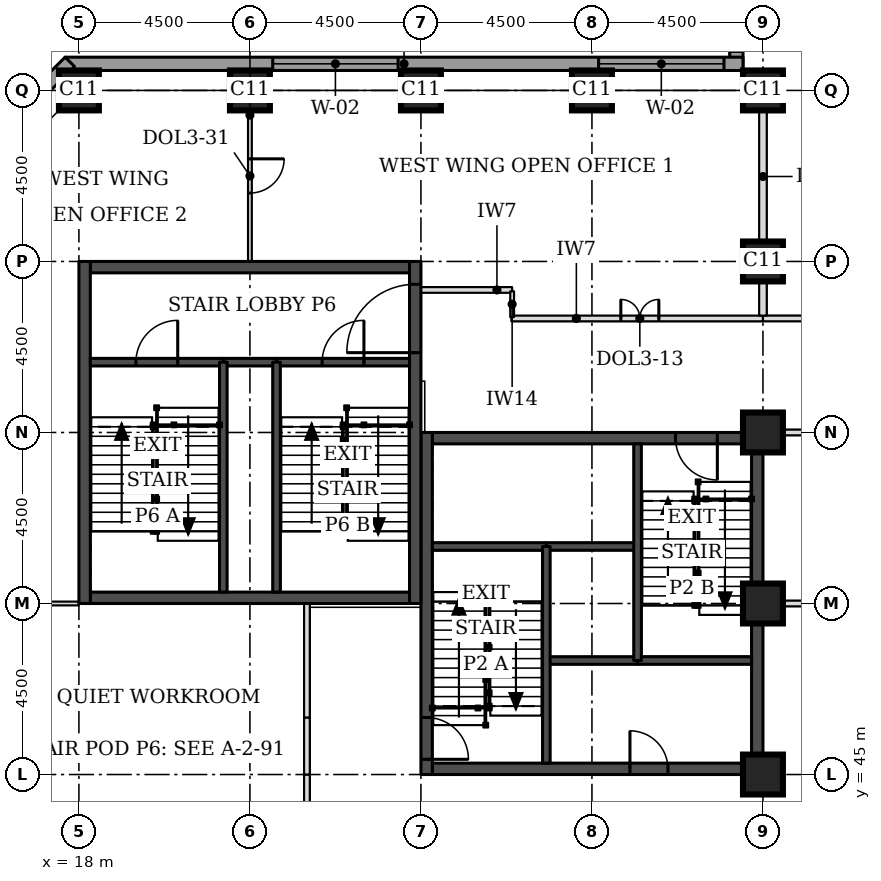
"""IFC4 building model, lengths in metres.
Left out: names, types, materials, properties, quantities, classifications, styles, units other than length and angle.
Written with IfcOpenShell. Run it as: python <this file> out.ifc"""

import sys

from ifc_helpers import new_model, si_unit, direction, frame, frame_2d, origin, origin_2d, place, context, subcontext, project, spatial, rectangle, extrude, element, fill, save


model = new_model("IFC4")
c1 = context("Model", 3, precision=1e-05, world=origin(), true_north=direction((0.0, 1.0)))
c2 = subcontext(c1, "Body", "Model", "MODEL_VIEW")
j1 = project(units=[si_unit("LENGTHUNIT", "METRE"), si_unit("PLANEANGLEUNIT", "RADIAN")], contexts=[c1])
p1 = place(None, origin())
s1 = spatial("IfcSite", under=j1, at=p1, CompositionType="ELEMENT")
p2 = place(p1, origin())
s2 = spatial("IfcBuilding", under=s1, at=p2, CompositionType="ELEMENT")
p3 = place(p2, frame((0.0, 0.0, 93.7)))
s3 = spatial("IfcBuildingStorey", under=s2, at=p3, CompositionType="ELEMENT", Elevation=93.7)
for number, where, z_axis, x_axis in (
    (1, (36.0, 45.0, 0.0), (0.0, 0.0, 1.0), (1.0, 0.0, 0.0)),
    (2, (36.0, 49.5, 0.0), (0.0, 0.0, 1.0), (1.0, 0.0, 0.0)),
    (3, (36.0, 54.0, 0.0), (0.0, 0.0, 1.0), (1.0, 0.0, 0.0)),
    (4, (36.0, 58.5, 0.0), (0.0, 0.0, 1.0), (1.0, 0.0, 0.0)),
    (5, (18.0, 63.0, 0.0), (0.0, 0.0, 1.0), (1.0, 0.0, 0.0)),
    (6, (22.5, 63.0, 0.0), (0.0, 0.0, 1.0), (1.0, 0.0, 0.0)),
    (7, (27.0, 63.0, 0.0), (0.0, 0.0, 1.0), (1.0, 0.0, 0.0)),
    (8, (31.5, 63.0, 0.0), (0.0, 0.0, 1.0), (1.0, 0.0, 0.0)),
    (9, (36.0, 63.0, 0.0), (0.0, 0.0, 1.0), (1.0, 0.0, 0.0)),
):
    element("IfcColumn", number, at=place(p3, frame(where, z_axis=z_axis, x_axis=x_axis)), inside=s3, PredefinedType="COLUMN", context=c2, shape_type="SweptSolid", body=[
        extrude(rectangle(XDim=1.05, YDim=1.05, at=origin_2d()), origin(), (0.0, 0.0, 1.0), 3.7),
    ])
p4 = place(p3, frame((27.3, 45.15, 0.0), z_axis=(0.0, 0.0, 1.0), x_axis=(1.0, 0.0, 0.0)))
e10 = element("IfcWall", 10, at=p4, inside=s3, PredefinedType="SHEAR", context=c2, shape_type="SweptSolid", body=[
    extrude(rectangle(XDim=8.4, YDim=0.3, at=frame_2d((4.2, 0.0))), origin(), (0.0, 0.0, 1.0), 3.7),
])
p5 = place(p4, frame((5.2, 0.0, 0.0)))
e11 = element("IfcOpeningElement", 11, at=p5, cuts=e10, PredefinedType="OPENING", context=c2, shape_type="SweptSolid", body=[
    extrude(rectangle(XDim=1.0, YDim=2.1, at=frame_2d((0.5, 1.05))), frame((0.0, 0.16, 0.0), z_axis=(0.0, -1.0, 0.0), x_axis=(1.0, 0.0, 0.0)), (0.0, 0.0, 1.0), 0.32),
])
p6 = place(p3, frame((27.3, 53.85, 0.0), z_axis=(0.0, 0.0, 1.0), x_axis=(1.0, 0.0, 0.0)))
e12 = element("IfcWall", 12, at=p6, inside=s3, PredefinedType="SHEAR", context=c2, shape_type="SweptSolid", body=[
    extrude(rectangle(XDim=8.4, YDim=0.3, at=frame_2d((4.2, 0.0))), origin(), (0.0, 0.0, 1.0), 3.7),
])
p7 = place(p6, frame((6.4, 0.0, 0.0)))
e13 = element("IfcOpeningElement", 13, at=p7, cuts=e12, PredefinedType="OPENING", context=c2, shape_type="SweptSolid", body=[
    extrude(rectangle(XDim=1.1, YDim=2.1, at=frame_2d((0.55, 1.05))), frame((0.0, 0.16, 0.0), z_axis=(0.0, -1.0, 0.0), x_axis=(1.0, 0.0, 0.0)), (0.0, 0.0, 1.0), 0.32),
])
p8 = place(p3, frame((27.15, 45.0, 0.0), z_axis=(0.0, 0.0, 1.0), x_axis=(0.0, 1.0, 0.0)))
e14 = element("IfcWall", 14, at=p8, inside=s3, PredefinedType="SHEAR", context=c2, shape_type="SweptSolid", body=[
    extrude(rectangle(XDim=9.0, YDim=0.3, at=frame_2d((4.5, 0.0))), origin(), (0.0, 0.0, 1.0), 3.7),
])
p9 = place(p8, frame((0.4, 0.0, 0.0)))
e15 = element("IfcOpeningElement", 15, at=p9, cuts=e14, PredefinedType="OPENING", context=c2, shape_type="SweptSolid", body=[
    extrude(rectangle(XDim=1.1, YDim=2.1, at=frame_2d((0.55, 1.05))), frame((0.0, 0.16, 0.0), z_axis=(0.0, -1.0, 0.0), x_axis=(1.0, 0.0, 0.0)), (0.0, 0.0, 1.0), 0.32),
])
p10 = place(p3, frame((35.85, 45.0, 0.0), z_axis=(0.0, 0.0, 1.0), x_axis=(0.0, 1.0, 0.0)))
e16 = element("IfcWall", 16, at=p10, inside=s3, PredefinedType="SHEAR", context=c2, shape_type="SweptSolid", body=[
    extrude(rectangle(XDim=9.0, YDim=0.3, at=frame_2d((4.5, 0.0))), origin(), (0.0, 0.0, 1.0), 3.7),
])
for number, where, z_axis, x_axis in (
    (17, (18.3, 49.65, 0.0), (0.0, 0.0, 1.0), (1.0, 0.0, 0.0)),
    (18, (18.3, 58.35, 0.0), (0.0, 0.0, 1.0), (1.0, 0.0, 0.0)),
):
    element("IfcWall", number, at=place(p3, frame(where, z_axis=z_axis, x_axis=x_axis)), inside=s3, PredefinedType="SHEAR", context=c2, shape_type="SweptSolid", body=[
        extrude(rectangle(XDim=8.4, YDim=0.3, at=frame_2d((4.2, 0.0))), origin(), (0.0, 0.0, 1.0), 3.7),
    ])
p11 = place(p3, frame((18.15, 49.5, 0.0), z_axis=(0.0, 0.0, 1.0), x_axis=(0.0, 1.0, 0.0)))
e19 = element("IfcWall", 19, at=p11, inside=s3, PredefinedType="SHEAR", context=c2, shape_type="SweptSolid", body=[
    extrude(rectangle(XDim=9.0, YDim=0.3, at=frame_2d((4.5, 0.0))), origin(), (0.0, 0.0, 1.0), 3.7),
])
p12 = place(p3, frame((26.85, 49.5, 0.0), z_axis=(0.0, 0.0, 1.0), x_axis=(0.0, 1.0, 0.0)))
e20 = element("IfcWall", 20, at=p12, inside=s3, PredefinedType="SHEAR", context=c2, shape_type="SweptSolid", body=[
    extrude(rectangle(XDim=9.0, YDim=0.3, at=frame_2d((4.5, 0.0))), origin(), (0.0, 0.0, 1.0), 3.7),
])
p13 = place(p12, frame((6.6, 0.0, 0.0)))
e21 = element("IfcOpeningElement", 21, at=p13, cuts=e20, PredefinedType="OPENING", context=c2, shape_type="SweptSolid", body=[
    extrude(rectangle(XDim=1.8, YDim=2.1, at=frame_2d((0.9, 1.05))), frame((0.0, 0.16, 0.0), z_axis=(0.0, -1.0, 0.0), x_axis=(1.0, 0.0, 0.0)), (0.0, 0.0, 1.0), 0.32),
])
p14 = place(p3, frame((35.3, 76.862, 0.0), z_axis=(0.0, 0.0, 1.0), x_axis=(0.0, -1.0, 0.0)))
e22 = element("IfcWall", 22, at=p14, inside=s3, PredefinedType="STANDARD", context=c2, shape_type="SweptSolid", body=[
    extrude(rectangle(XDim=13.337, YDim=0.35, at=frame_2d((6.669, 0.0))), origin(), (0.0, 0.0, 1.0), 3.525),
])
p15 = place(p14, frame((9.537, 0.0, 0.9)))
e23 = element("IfcOpeningElement", 23, at=p15, cuts=e22, PredefinedType="OPENING", context=c2, shape_type="SweptSolid", body=[
    extrude(rectangle(XDim=3.3, YDim=1.9, at=frame_2d((1.65, 0.95))), frame((0.0, 0.185, 0.0), z_axis=(0.0, -1.0, 0.0), x_axis=(1.0, 0.0, 0.0)), (0.0, 0.0, 1.0), 0.37),
])
p16 = place(p3, frame((35.475, 63.7, 0.0), z_axis=(0.0, 0.0, 1.0), x_axis=(-1.0, 0.0, 0.0)))
e24 = element("IfcWall", 24, at=p16, inside=s3, PredefinedType="STANDARD", context=c2, shape_type="SweptSolid", body=[
    extrude(rectangle(XDim=17.837, YDim=0.35, at=frame_2d((8.919, 0.0))), origin(), (0.0, 0.0, 1.0), 3.525),
])
p17 = place(p16, frame((0.5, 0.0, 0.9)))
e25 = element("IfcOpeningElement", 25, at=p17, cuts=e24, PredefinedType="OPENING", context=c2, shape_type="SweptSolid", body=[
    extrude(rectangle(XDim=3.3, YDim=1.9, at=frame_2d((1.65, 0.95))), frame((0.0, 0.185, 0.0), z_axis=(0.0, -1.0, 0.0), x_axis=(1.0, 0.0, 0.0)), (0.0, 0.0, 1.0), 0.37),
])
p18 = place(p16, frame((9.075, 0.0, 0.9)))
e26 = element("IfcOpeningElement", 26, at=p18, cuts=e24, PredefinedType="OPENING", context=c2, shape_type="SweptSolid", body=[
    extrude(rectangle(XDim=3.3, YDim=1.9, at=frame_2d((1.65, 0.95))), frame((0.0, 0.185, 0.0), z_axis=(0.0, -1.0, 0.0), x_axis=(1.0, 0.0, 0.0)), (0.0, 0.0, 1.0), 0.37),
])
p19 = place(p3, frame((17.761, 63.751, 0.0), z_axis=(0.0, 0.0, 1.0), x_axis=(-0.707106781187, -0.707106781187, 0.0)))
e27 = element("IfcWall", 27, at=p19, inside=s3, PredefinedType="STANDARD", context=c2, shape_type="SweptSolid", body=[
    extrude(rectangle(XDim=7.089, YDim=0.35, at=frame_2d((3.544, 0.0))), origin(), (0.0, 0.0, 1.0), 3.525),
])
p20 = place(p19, frame((1.894, 0.0, 0.9)))
e28 = element("IfcOpeningElement", 28, at=p20, cuts=e27, PredefinedType="OPENING", context=c2, shape_type="SweptSolid", body=[
    extrude(rectangle(XDim=3.3, YDim=1.9, at=frame_2d((1.65, 0.95))), frame((0.0, 0.185, 0.0), z_axis=(0.0, -1.0, 0.0), x_axis=(1.0, 0.0, 0.0)), (0.0, 0.0, 1.0), 0.37),
])
p21 = place(p3, frame((12.749, 44.761, 0.0), z_axis=(0.0, 0.0, 1.0), x_axis=(0.707106781187, -0.707106781187, 0.0)))
e29 = element("IfcWall", 29, at=p21, inside=s3, PredefinedType="STANDARD", context=c2, shape_type="SweptSolid", body=[
    extrude(rectangle(XDim=7.089, YDim=0.35, at=frame_2d((3.544, 0.0))), origin(), (0.0, 0.0, 1.0), 3.525),
])
p22 = place(p21, frame((1.894, 0.0, 0.9)))
e30 = element("IfcOpeningElement", 30, at=p22, cuts=e29, PredefinedType="OPENING", context=c2, shape_type="SweptSolid", body=[
    extrude(rectangle(XDim=3.3, YDim=1.9, at=frame_2d((1.65, 0.95))), frame((0.0, 0.185, 0.0), z_axis=(0.0, -1.0, 0.0), x_axis=(1.0, 0.0, 0.0)), (0.0, 0.0, 1.0), 0.37),
])
for number, where, z_axis, x_axis in (
    (31, (36.525, 49.5, 0.0), (0.0, 0.0, 1.0), (1.0, 0.0, 0.0)),
    (32, (36.525, 54.0, 0.0), (0.0, 0.0, 1.0), (1.0, 0.0, 0.0)),
):
    element("IfcWall", number, at=place(p3, frame(where, z_axis=z_axis, x_axis=x_axis)), inside=s3, PredefinedType="PARTITIONING", context=c2, shape_type="SweptSolid", body=[
        extrude(rectangle(XDim=5.55, YDim=0.15, at=frame_2d((2.775, 0.0))), origin(), (0.0, 0.0, 1.0), 3.55),
    ])
p23 = place(p3, frame((29.38, 57.0, 0.0), z_axis=(0.0, 0.0, 1.0), x_axis=(1.0, 0.0, 0.0)))
e33 = element("IfcWall", 33, at=p23, inside=s3, PredefinedType="PARTITIONING", context=c2, shape_type="SweptSolid", body=[
    extrude(rectangle(XDim=6.62, YDim=0.15, at=frame_2d((3.31, 0.0))), origin(), (0.0, 0.0, 1.0), 3.55),
])
p24 = place(p23, frame((2.88, 0.0, 0.0)))
e34 = element("IfcOpeningElement", 34, at=p24, cuts=e33, PredefinedType="OPENING", context=c2, shape_type="SweptSolid", body=[
    extrude(rectangle(XDim=1.0, YDim=2.1, at=frame_2d((0.5, 1.05))), frame((0.0, 0.085, 0.0), z_axis=(0.0, -1.0, 0.0), x_axis=(1.0, 0.0, 0.0)), (0.0, 0.0, 1.0), 0.17),
])
p25 = place(p3, frame((36.0, 57.0, 0.0), z_axis=(0.0, 0.0, 1.0), x_axis=(1.0, 0.0, 0.0)))
e35 = element("IfcWall", 35, at=p25, inside=s3, PredefinedType="PARTITIONING", context=c2, shape_type="SweptSolid", body=[
    extrude(rectangle(XDim=6.075, YDim=0.15, at=frame_2d((3.038, 0.0))), origin(), (0.0, 0.0, 1.0), 3.55),
])
p26 = place(p25, frame((2.55, 0.0, 0.0)))
e36 = element("IfcOpeningElement", 36, at=p26, cuts=e35, PredefinedType="OPENING", context=c2, shape_type="SweptSolid", body=[
    extrude(rectangle(XDim=1.0, YDim=2.1, at=frame_2d((0.5, 1.05))), frame((0.0, 0.085, 0.0), z_axis=(0.0, -1.0, 0.0), x_axis=(1.0, 0.0, 0.0)), (0.0, 0.0, 1.0), 0.17),
])
for number, where, z_axis, x_axis in (
    (37, (24.0, 43.5, 0.0), (0.0, 0.0, 1.0), (0.0, 1.0, 0.0)),
    (38, (24.0, 45.0, 0.0), (0.0, 0.0, 1.0), (0.0, 1.0, 0.0)),
):
    element("IfcWall", number, at=place(p3, frame(where, z_axis=z_axis, x_axis=x_axis)), inside=s3, PredefinedType="PARTITIONING", context=c2, shape_type="SweptSolid", body=[
        extrude(rectangle(XDim=1.5, YDim=0.15, at=frame_2d((0.75, 0.0))), origin(), (0.0, 0.0, 1.0), 3.55),
    ])
p27 = place(p3, frame((24.0, 46.5, 0.0), z_axis=(0.0, 0.0, 1.0), x_axis=(0.0, 1.0, 0.0)))
e39 = element("IfcWall", 39, at=p27, inside=s3, PredefinedType="PARTITIONING", context=c2, shape_type="SweptSolid", body=[
    extrude(rectangle(XDim=3.0, YDim=0.15, at=frame_2d((1.5, 0.0))), origin(), (0.0, 0.0, 1.0), 3.55),
])
p28 = place(p3, frame((36.0, 57.075, 0.0), z_axis=(0.0, 0.0, 1.0), x_axis=(0.0, 1.0, 0.0)))
e40 = element("IfcWall", 40, at=p28, inside=s3, PredefinedType="PARTITIONING", context=c2, shape_type="SweptSolid", body=[
    extrude(rectangle(XDim=0.9, YDim=0.2, at=frame_2d((0.45, 0.0))), origin(), (0.0, 0.0, 1.0), 2.8),
])
p29 = place(p3, frame((36.0, 58.995, 0.0), z_axis=(0.0, 0.0, 1.0), x_axis=(0.0, 1.0, 0.0)))
e41 = element("IfcWall", 41, at=p29, inside=s3, PredefinedType="PARTITIONING", context=c2, shape_type="SweptSolid", body=[
    extrude(rectangle(XDim=3.48, YDim=0.2, at=frame_2d((1.74, 0.0))), origin(), (0.0, 0.0, 1.0), 2.8),
])
p30 = place(p3, frame((22.5, 63.0, 0.0), z_axis=(0.0, 0.0, 1.0), x_axis=(0.0, -1.0, 0.0)))
e42 = element("IfcWall", 42, at=p30, inside=s3, PredefinedType="PARTITIONING", context=c2, shape_type="SweptSolid", body=[
    extrude(rectangle(XDim=4.5, YDim=0.1, at=frame_2d((2.25, 0.0))), origin(), (0.0, 0.0, 1.0), 3.55),
])
p31 = place(p30, frame((1.8, 0.0, 0.0)))
e43 = element("IfcOpeningElement", 43, at=p31, cuts=e42, PredefinedType="OPENING", context=c2, shape_type="SweptSolid", body=[
    extrude(rectangle(XDim=0.9, YDim=2.1, at=frame_2d((0.45, 1.05))), frame((0.0, 0.06, 0.0), z_axis=(0.0, -1.0, 0.0), x_axis=(1.0, 0.0, 0.0)), (0.0, 0.0, 1.0), 0.12),
])
p32 = place(p3, frame((13.5, 49.5, 0.0), z_axis=(0.0, 0.0, 1.0), x_axis=(1.0, 0.0, 0.0)))
e44 = element("IfcWall", 44, at=p32, inside=s3, PredefinedType="PARTITIONING", context=c2, shape_type="SweptSolid", body=[
    extrude(rectangle(XDim=4.5, YDim=0.1, at=frame_2d((2.25, 0.0))), origin(), (0.0, 0.0, 1.0), 3.55),
])
p33 = place(p32, frame((1.8, 0.0, 0.0)))
e45 = element("IfcOpeningElement", 45, at=p33, cuts=e44, PredefinedType="OPENING", context=c2, shape_type="SweptSolid", body=[
    extrude(rectangle(XDim=0.9, YDim=2.1, at=frame_2d((0.45, 1.05))), frame((0.0, 0.06, 0.0), z_axis=(0.0, -1.0, 0.0), x_axis=(1.0, 0.0, 0.0)), (0.0, 0.0, 1.0), 0.12),
])
p34 = place(p3, frame((27.0, 57.75, 0.0), z_axis=(0.0, 0.0, 1.0), x_axis=(1.0, 0.0, 0.0)))
e46 = element("IfcWall", 46, at=p34, inside=s3, PredefinedType="PARTITIONING", context=c2, shape_type="SweptSolid", body=[
    extrude(rectangle(XDim=2.4, YDim=0.15, at=frame_2d((1.2, 0.0))), origin(), (0.0, 0.0, 1.0), 3.55),
])
p35 = place(p3, frame((29.4, 57.715, 0.0), z_axis=(0.0, 0.0, 1.0), x_axis=(0.0, -1.0, 0.0)))
e47 = element("IfcWall", 47, at=p35, inside=s3, PredefinedType="PARTITIONING", context=c2, shape_type="SweptSolid", body=[
    extrude(rectangle(XDim=0.68, YDim=0.1, at=frame_2d((0.34, 0.0))), origin(), (0.0, 0.0, 1.0), 3.55),
])
p36 = place(p3, frame((30.3, 48.0, 0.0), z_axis=(0.0, 0.0, 1.0), x_axis=(1.0, 0.0, 0.0)))
e48 = element("IfcWall", 48, at=p36, inside=s3, PredefinedType="SOLIDWALL", context=c2, shape_type="SweptSolid", body=[
    extrude(rectangle(XDim=2.4, YDim=0.2, at=frame_2d((1.2, 0.0))), origin(), (0.0, 0.0, 1.0), 3.55),
])
p37 = place(p3, frame((32.7, 48.0, 0.0), z_axis=(0.0, 0.0, 1.0), x_axis=(1.0, 0.0, 0.0)))
e49 = element("IfcWall", 49, at=p37, inside=s3, PredefinedType="SOLIDWALL", context=c2, shape_type="SweptSolid", body=[
    extrude(rectangle(XDim=3.0, YDim=0.2, at=frame_2d((1.5, 0.0))), origin(), (0.0, 0.0, 1.0), 3.55),
])
p38 = place(p3, frame((30.3, 51.0, 0.0), z_axis=(0.0, 0.0, 1.0), x_axis=(1.0, 0.0, 0.0)))
e50 = element("IfcWall", 50, at=p38, inside=s3, PredefinedType="SOLIDWALL", context=c2, shape_type="SweptSolid", body=[
    extrude(rectangle(XDim=2.4, YDim=0.2, at=frame_2d((1.2, 0.0))), origin(), (0.0, 0.0, 1.0), 3.7),
])
p39 = place(p3, frame((27.3, 51.0, 0.0), z_axis=(0.0, 0.0, 1.0), x_axis=(1.0, 0.0, 0.0)))
e51 = element("IfcWall", 51, at=p39, inside=s3, PredefinedType="SOLIDWALL", context=c2, shape_type="SweptSolid", body=[
    extrude(rectangle(XDim=3.0, YDim=0.2, at=frame_2d((1.5, 0.0))), origin(), (0.0, 0.0, 1.0), 3.55),
])
for number, where, z_axis, x_axis in (
    (52, (30.3, 45.3, 0.0), (0.0, 0.0, 1.0), (0.0, 1.0, 0.0)),
    (53, (32.7, 48.0, 0.0), (0.0, 0.0, 1.0), (0.0, 1.0, 0.0)),
):
    element("IfcWall", number, at=place(p3, frame(where, z_axis=z_axis, x_axis=x_axis)), inside=s3, PredefinedType="SOLIDWALL", context=c2, shape_type="SweptSolid", body=[
        extrude(rectangle(XDim=5.7, YDim=0.2, at=frame_2d((2.85, 0.0))), origin(), (0.0, 0.0, 1.0), 3.55),
    ])
p40 = place(p3, frame((21.8, 55.85, 0.0), z_axis=(0.0, 0.0, 1.0), x_axis=(1.0, 0.0, 0.0)))
e54 = element("IfcWall", 54, at=p40, inside=s3, PredefinedType="SOLIDWALL", context=c2, shape_type="SweptSolid", body=[
    extrude(rectangle(XDim=1.4, YDim=0.2, at=frame_2d((0.7, 0.0))), origin(), (0.0, 0.0, 1.0), 3.55),
])
p41 = place(p3, frame((18.3, 55.85, 0.0), z_axis=(0.0, 0.0, 1.0), x_axis=(1.0, 0.0, 0.0)))
e55 = element("IfcWall", 55, at=p41, inside=s3, PredefinedType="SOLIDWALL", context=c2, shape_type="SweptSolid", body=[
    extrude(rectangle(XDim=3.5, YDim=0.2, at=frame_2d((1.75, 0.0))), origin(), (0.0, 0.0, 1.0), 3.55),
])
p42 = place(p41, frame((1.2, 0.0, 0.0)))
e56 = element("IfcOpeningElement", 56, at=p42, cuts=e55, PredefinedType="OPENING", context=c2, shape_type="SweptSolid", body=[
    extrude(rectangle(XDim=1.1, YDim=2.1, at=frame_2d((0.55, 1.05))), frame((0.0, 0.11, 0.0), z_axis=(0.0, -1.0, 0.0), x_axis=(1.0, 0.0, 0.0)), (0.0, 0.0, 1.0), 0.22),
])
p43 = place(p3, frame((23.2, 55.85, 0.0), z_axis=(0.0, 0.0, 1.0), x_axis=(1.0, 0.0, 0.0)))
e57 = element("IfcWall", 57, at=p43, inside=s3, PredefinedType="SOLIDWALL", context=c2, shape_type="SweptSolid", body=[
    extrude(rectangle(XDim=3.5, YDim=0.2, at=frame_2d((1.75, 0.0))), origin(), (0.0, 0.0, 1.0), 3.55),
])
p44 = place(p43, frame((1.2, 0.0, 0.0)))
e58 = element("IfcOpeningElement", 58, at=p44, cuts=e57, PredefinedType="OPENING", context=c2, shape_type="SweptSolid", body=[
    extrude(rectangle(XDim=1.1, YDim=2.1, at=frame_2d((0.55, 1.05))), frame((0.0, 0.11, 0.0), z_axis=(0.0, -1.0, 0.0), x_axis=(1.0, 0.0, 0.0)), (0.0, 0.0, 1.0), 0.22),
])
for number, where, z_axis, x_axis in (
    (59, (21.8, 49.8, 0.0), (0.0, 0.0, 1.0), (0.0, 1.0, 0.0)),
    (60, (23.2, 49.8, 0.0), (0.0, 0.0, 1.0), (0.0, 1.0, 0.0)),
):
    element("IfcWall", number, at=place(p3, frame(where, z_axis=z_axis, x_axis=x_axis)), inside=s3, PredefinedType="SOLIDWALL", context=c2, shape_type="SweptSolid", body=[
        extrude(rectangle(XDim=6.05, YDim=0.2, at=frame_2d((3.025, 0.0))), origin(), (0.0, 0.0, 1.0), 3.55),
    ])
p45 = place(p17, origin())
e61 = element("IfcWindow", 61, at=p45, inside=s3, PartitioningType="SINGLE_PANEL", PredefinedType="WINDOW", context=c2, shape_type="SweptSolid", body=[
    extrude(rectangle(XDim=3.3, YDim=1.9, at=frame_2d((1.65, 0.95))), frame((0.0, 0.085, 0.0), z_axis=(0.0, -1.0, 0.0), x_axis=(1.0, 0.0, 0.0)), (0.0, 0.0, 1.0), 0.06),
])
fill(e25, e61)
p46 = place(p18, origin())
e62 = element("IfcWindow", 62, at=p46, inside=s3, PartitioningType="SINGLE_PANEL", PredefinedType="WINDOW", context=c2, shape_type="SweptSolid", body=[
    extrude(rectangle(XDim=3.3, YDim=1.9, at=frame_2d((1.65, 0.95))), frame((0.0, 0.085, 0.0), z_axis=(0.0, -1.0, 0.0), x_axis=(1.0, 0.0, 0.0)), (0.0, 0.0, 1.0), 0.06),
])
fill(e26, e62)
p47 = place(p24, origin())
e63 = element("IfcDoor", 63, at=p47, inside=s3, OperationType="DOUBLE_DOOR_SINGLE_SWING", PredefinedType="DOOR", context=c2, shape_type="SweptSolid", body=[
    extrude(rectangle(XDim=1.0, YDim=2.1, at=frame_2d((0.5, 1.05))), frame((0.0, 0.025, 0.0), z_axis=(0.0, -1.0, 0.0), x_axis=(1.0, 0.0, 0.0)), (0.0, 0.0, 1.0), 0.05),
])
fill(e34, e63)
p48 = place(p31, origin())
e64 = element("IfcDoor", 64, at=p48, inside=s3, OperationType="SINGLE_SWING_LEFT", PredefinedType="DOOR", context=c2, shape_type="SweptSolid", body=[
    extrude(rectangle(XDim=0.9, YDim=2.1, at=frame_2d((0.45, 1.05))), frame((0.0, 0.025, 0.0), z_axis=(0.0, -1.0, 0.0), x_axis=(1.0, 0.0, 0.0)), (0.0, 0.0, 1.0), 0.05),
])
fill(e43, e64)
p49 = place(p9, frame((1.1, 0.0, 0.0), z_axis=(0.0, 0.0, 1.0), x_axis=(-1.0, 0.0, 0.0)))
e65 = element("IfcDoor", 65, at=p49, inside=s3, OperationType="SINGLE_SWING_RIGHT", PredefinedType="DOOR", context=c2, shape_type="SweptSolid", body=[
    extrude(rectangle(XDim=1.1, YDim=2.1, at=frame_2d((0.55, 1.05))), frame((0.0, 0.025, 0.0), z_axis=(0.0, -1.0, 0.0), x_axis=(1.0, 0.0, 0.0)), (0.0, 0.0, 1.0), 0.05),
])
fill(e15, e65)
p50 = place(p7, frame((1.1, 0.0, 0.0), z_axis=(0.0, 0.0, 1.0), x_axis=(-1.0, 0.0, 0.0)))
e66 = element("IfcDoor", 66, at=p50, inside=s3, OperationType="SINGLE_SWING_LEFT", PredefinedType="DOOR", context=c2, shape_type="SweptSolid", body=[
    extrude(rectangle(XDim=1.1, YDim=2.1, at=frame_2d((0.55, 1.05))), frame((0.0, 0.025, 0.0), z_axis=(0.0, -1.0, 0.0), x_axis=(1.0, 0.0, 0.0)), (0.0, 0.0, 1.0), 0.05),
])
fill(e13, e66)
p51 = place(p5, origin())
e67 = element("IfcDoor", 67, at=p51, inside=s3, OperationType="SINGLE_SWING_LEFT", PredefinedType="DOOR", context=c2, shape_type="SweptSolid", body=[
    extrude(rectangle(XDim=1.0, YDim=2.1, at=frame_2d((0.5, 1.05))), frame((0.0, 0.025, 0.0), z_axis=(0.0, -1.0, 0.0), x_axis=(1.0, 0.0, 0.0)), (0.0, 0.0, 1.0), 0.05),
])
fill(e11, e67)
p52 = place(p42, origin())
e68 = element("IfcDoor", 68, at=p52, inside=s3, OperationType="SINGLE_SWING_RIGHT", PredefinedType="DOOR", context=c2, shape_type="SweptSolid", body=[
    extrude(rectangle(XDim=1.1, YDim=2.1, at=frame_2d((0.55, 1.05))), frame((0.0, 0.025, 0.0), z_axis=(0.0, -1.0, 0.0), x_axis=(1.0, 0.0, 0.0)), (0.0, 0.0, 1.0), 0.05),
])
fill(e56, e68)
p53 = place(p44, origin())
e69 = element("IfcDoor", 69, at=p53, inside=s3, OperationType="SINGLE_SWING_RIGHT", PredefinedType="DOOR", context=c2, shape_type="SweptSolid", body=[
    extrude(rectangle(XDim=1.1, YDim=2.1, at=frame_2d((0.55, 1.05))), frame((0.0, 0.025, 0.0), z_axis=(0.0, -1.0, 0.0), x_axis=(1.0, 0.0, 0.0)), (0.0, 0.0, 1.0), 0.05),
])
fill(e58, e69)
p54 = place(p13, origin())
e70 = element("IfcDoor", 70, at=p54, inside=s3, OperationType="SINGLE_SWING_LEFT", PredefinedType="DOOR", context=c2, shape_type="SweptSolid", body=[
    extrude(rectangle(XDim=1.8, YDim=2.1, at=frame_2d((0.9, 1.05))), frame((0.0, 0.025, 0.0), z_axis=(0.0, -1.0, 0.0), x_axis=(1.0, 0.0, 0.0)), (0.0, 0.0, 1.0), 0.05),
])
fill(e21, e70)
save(model, sys.argv[1])
